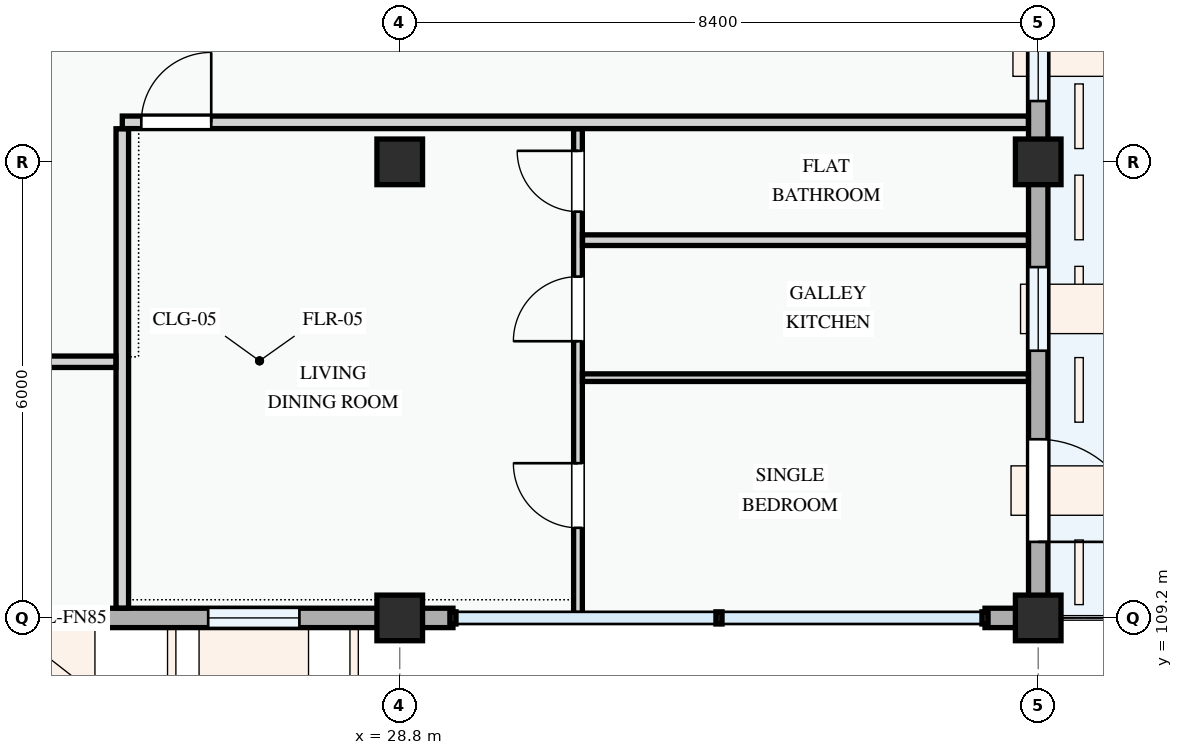
"""IFC4 building model, lengths in metres.
Left out: names, types, materials, properties, quantities, classifications, styles, units other than length and angle.
Written with IfcOpenShell. Run it as: python <this file> out.ifc"""

import sys

from ifc_helpers import new_model, si_unit, direction, frame, frame_2d, origin, origin_2d, place, context, subcontext, project, spatial, rectangle, extrude, element, fill, save


model = new_model("IFC4")
c1 = context("Model", 3, precision=1e-05, world=origin(), true_north=direction((0.0, 1.0)))
c2 = subcontext(c1, "Body", "Model", "MODEL_VIEW")
j1 = project(units=[si_unit("LENGTHUNIT", "METRE"), si_unit("PLANEANGLEUNIT", "RADIAN")], contexts=[c1])
p1 = place(None, origin())
s1 = spatial("IfcSite", under=j1, at=p1, CompositionType="ELEMENT")
p2 = place(p1, origin())
s2 = spatial("IfcBuilding", under=s1, at=p2, CompositionType="ELEMENT")
p3 = place(p2, frame((0.0, 0.0, 37.8)))
s3 = spatial("IfcBuildingStorey", under=s2, at=p3, CompositionType="ELEMENT", Elevation=37.8)
for number, where, z_axis, x_axis in (
    (1, (28.8, 109.2, 0.0), (0.0, 0.0, 1.0), (1.0, 0.0, 0.0)),
    (2, (28.8, 115.2, 0.0), (0.0, 0.0, 1.0), (1.0, 0.0, 0.0)),
    (3, (37.2, 109.2, 0.0), (0.0, 0.0, 1.0), (1.0, 0.0, 0.0)),
    (4, (37.2, 115.2, 0.0), (0.0, 0.0, 1.0), (1.0, 0.0, 0.0)),
):
    element("IfcColumn", number, at=place(p3, frame(where, z_axis=z_axis, x_axis=x_axis)), inside=s3, PredefinedType="COLUMN", context=c2, shape_type="SweptSolid", body=[
        extrude(rectangle(XDim=0.6, YDim=0.6, at=origin_2d()), origin(), (0.0, 0.0, 1.0), 3.3),
    ])
p4 = place(p3, frame((22.8, 109.2, 0.0), z_axis=(0.0, 0.0, 1.0), x_axis=(1.0, 0.0, 0.0)))
e5 = element("IfcWall", 5, at=p4, inside=s3, PredefinedType="STANDARD", context=c2, shape_type="SweptSolid", body=[
    extrude(rectangle(XDim=6.0, YDim=0.255, at=frame_2d((3.0, 0.0))), origin(), (0.0, 0.0, 1.0), 2.525),
])
p5 = place(p4, frame((0.67, 0.0, 0.78)))
e6 = element("IfcOpeningElement", 6, at=p5, cuts=e5, PredefinedType="OPENING", context=c2, shape_type="SweptSolid", body=[
    extrude(rectangle(XDim=1.2, YDim=1.35, at=frame_2d((0.6, 0.675))), frame((0.0, 0.137, 0.0), z_axis=(0.0, -1.0, 0.0), x_axis=(1.0, 0.0, 0.0)), (0.0, 0.0, 1.0), 0.275),
])
p6 = place(p4, frame((3.48, 0.0, 0.78)))
e7 = element("IfcOpeningElement", 7, at=p6, cuts=e5, PredefinedType="OPENING", context=c2, shape_type="SweptSolid", body=[
    extrude(rectangle(XDim=1.2, YDim=1.5, at=frame_2d((0.6, 0.75))), frame((0.0, 0.137, 0.0), z_axis=(0.0, -1.0, 0.0), x_axis=(1.0, 0.0, 0.0)), (0.0, 0.0, 1.0), 0.275),
])
p7 = place(p3, frame((28.8, 109.2, 0.0), z_axis=(0.0, 0.0, 1.0), x_axis=(1.0, 0.0, 0.0)))
e8 = element("IfcWall", 8, at=p7, inside=s3, PredefinedType="STANDARD", context=c2, shape_type="SweptSolid", body=[
    extrude(rectangle(XDim=0.7, YDim=0.255, at=frame_2d((0.35, 0.0))), origin(), (0.0, 0.0, 1.0), 2.375),
])
p8 = place(p3, frame((36.5, 109.2, 0.0), z_axis=(0.0, 0.0, 1.0), x_axis=(1.0, 0.0, 0.0)))
e9 = element("IfcWall", 9, at=p8, inside=s3, PredefinedType="STANDARD", context=c2, shape_type="SweptSolid", body=[
    extrude(rectangle(XDim=0.571, YDim=0.255, at=frame_2d((0.285, 0.0))), origin(), (0.0, 0.0, 1.0), 2.375),
])
p9 = place(p3, frame((37.2, 109.2, 0.0), z_axis=(0.0, 0.0, 1.0), x_axis=(0.0, 1.0, 0.0)))
e10 = element("IfcWall", 10, at=p9, inside=s3, PredefinedType="STANDARD", context=c2, shape_type="SweptSolid", body=[
    extrude(rectangle(XDim=6.0, YDim=0.255, at=frame_2d((3.0, 0.0))), origin(), (0.0, 0.0, 1.0), 2.575),
])
p10 = place(p9, frame((1.0, 0.0, 0.0)))
e11 = element("IfcOpeningElement", 11, at=p10, cuts=e10, PredefinedType="OPENING", context=c2, shape_type="SweptSolid", body=[
    extrude(rectangle(XDim=1.35, YDim=2.2, at=frame_2d((0.675, 1.1))), frame((0.0, 0.137, 0.0), z_axis=(0.0, -1.0, 0.0), x_axis=(1.0, 0.0, 0.0)), (0.0, 0.0, 1.0), 0.275),
])
p11 = place(p9, frame((3.515, 0.0, 0.78)))
e12 = element("IfcOpeningElement", 12, at=p11, cuts=e10, PredefinedType="OPENING", context=c2, shape_type="SweptSolid", body=[
    extrude(rectangle(XDim=1.1, YDim=1.3, at=frame_2d((0.55, 0.65))), frame((0.0, 0.137, 0.0), z_axis=(0.0, -1.0, 0.0), x_axis=(1.0, 0.0, 0.0)), (0.0, 0.0, 1.0), 0.275),
])
p12 = place(p3, frame((37.2, 115.2, 0.0), z_axis=(0.0, 0.0, 1.0), x_axis=(0.0, 1.0, 0.0)))
e13 = element("IfcWall", 13, at=p12, inside=s3, PredefinedType="STANDARD", context=c2, shape_type="SweptSolid", body=[
    extrude(rectangle(XDim=8.4, YDim=0.255, at=frame_2d((4.2, 0.0))), origin(), (0.0, 0.0, 1.0), 2.425),
])
p13 = place(p12, frame((6.27, 0.0, 0.0)))
e14 = element("IfcOpeningElement", 14, at=p13, cuts=e13, PredefinedType="OPENING", context=c2, shape_type="SweptSolid", body=[
    extrude(rectangle(XDim=1.15, YDim=2.15, at=frame_2d((0.575, 1.075))), frame((0.0, 0.137, 0.0), z_axis=(0.0, -1.0, 0.0), x_axis=(1.0, 0.0, 0.0)), (0.0, 0.0, 1.0), 0.275),
])
p14 = place(p12, frame((0.8, 0.0, 0.78)))
e15 = element("IfcOpeningElement", 15, at=p14, cuts=e13, PredefinedType="OPENING", context=c2, shape_type="SweptSolid", body=[
    extrude(rectangle(XDim=1.3, YDim=1.4, at=frame_2d((0.65, 0.7))), frame((0.0, 0.137, 0.0), z_axis=(0.0, -1.0, 0.0), x_axis=(1.0, 0.0, 0.0)), (0.0, 0.0, 1.0), 0.275),
])
p15 = place(p12, frame((4.145, 0.0, 0.78)))
e16 = element("IfcOpeningElement", 16, at=p15, cuts=e13, PredefinedType="OPENING", context=c2, shape_type="SweptSolid", body=[
    extrude(rectangle(XDim=1.0, YDim=1.25, at=frame_2d((0.5, 0.625))), frame((0.0, 0.137, 0.0), z_axis=(0.0, -1.0, 0.0), x_axis=(1.0, 0.0, 0.0)), (0.0, 0.0, 1.0), 0.275),
])
p16 = place(p3, frame((25.15, 109.33, 0.0), z_axis=(0.0, 0.0, 1.0), x_axis=(0.0, 1.0, 0.0)))
e17 = element("IfcWall", 17, at=p16, inside=s3, PredefinedType="PARTITIONING", context=c2, shape_type="SweptSolid", body=[
    extrude(rectangle(XDim=6.306, YDim=0.165, at=frame_2d((3.153, 0.0))), origin(), (0.0, 0.0, 1.0), 3.0),
])
p17 = place(p3, frame((22.66, 112.57, 0.0), z_axis=(0.0, 0.0, 1.0), x_axis=(1.0, 0.0, 0.0)))
e18 = element("IfcWall", 18, at=p17, inside=s3, PredefinedType="PARTITIONING", context=c2, shape_type="SweptSolid", body=[
    extrude(rectangle(XDim=2.406, YDim=0.15, at=frame_2d((1.203, 0.0))), origin(), (0.0, 0.0, 1.0), 3.0),
])
p18 = place(p3, frame((31.145, 109.26, 0.0), z_axis=(0.0, 0.0, 1.0), x_axis=(0.0, 1.0, 0.0)))
e19 = element("IfcWall", 19, at=p18, inside=s3, PredefinedType="PARTITIONING", context=c2, shape_type="SweptSolid", body=[
    extrude(rectangle(XDim=6.375, YDim=0.115, at=frame_2d((3.188, 0.0))), origin(), (0.0, 0.0, 1.0), 3.0),
])
p19 = place(p18, frame((1.125, 0.0, 0.0)))
e20 = element("IfcOpeningElement", 20, at=p19, cuts=e19, PredefinedType="OPENING", context=c2, shape_type="SweptSolid", body=[
    extrude(rectangle(XDim=0.85, YDim=2.1, at=frame_2d((0.425, 1.05))), frame((0.0, 0.067, 0.0), z_axis=(0.0, -1.0, 0.0), x_axis=(1.0, 0.0, 0.0)), (0.0, 0.0, 1.0), 0.135),
])
p20 = place(p18, frame((3.58, 0.0, 0.0)))
e21 = element("IfcOpeningElement", 21, at=p20, cuts=e19, PredefinedType="OPENING", context=c2, shape_type="SweptSolid", body=[
    extrude(rectangle(XDim=0.85, YDim=2.1, at=frame_2d((0.425, 1.05))), frame((0.0, 0.067, 0.0), z_axis=(0.0, -1.0, 0.0), x_axis=(1.0, 0.0, 0.0)), (0.0, 0.0, 1.0), 0.135),
])
p21 = place(p18, frame((5.285, 0.0, 0.0)))
e22 = element("IfcOpeningElement", 22, at=p21, cuts=e19, PredefinedType="OPENING", context=c2, shape_type="SweptSolid", body=[
    extrude(rectangle(XDim=0.8, YDim=2.1, at=frame_2d((0.4, 1.05))), frame((0.0, 0.067, 0.0), z_axis=(0.0, -1.0, 0.0), x_axis=(1.0, 0.0, 0.0)), (0.0, 0.0, 1.0), 0.135),
])
p22 = place(p3, frame((31.205, 112.361, 0.0), z_axis=(0.0, 0.0, 1.0), x_axis=(1.0, 0.0, 0.0)))
e23 = element("IfcWall", 23, at=p22, inside=s3, PredefinedType="PARTITIONING", context=c2, shape_type="SweptSolid", body=[
    extrude(rectangle(XDim=5.866, YDim=0.1, at=frame_2d((2.933, 0.0))), origin(), (0.0, 0.0, 1.0), 3.0),
])
p23 = place(p3, frame((31.205, 114.17, 0.0), z_axis=(0.0, 0.0, 1.0), x_axis=(1.0, 0.0, 0.0)))
e24 = element("IfcWall", 24, at=p23, inside=s3, PredefinedType="PARTITIONING", context=c2, shape_type="SweptSolid", body=[
    extrude(rectangle(XDim=5.866, YDim=0.14, at=frame_2d((2.933, 0.0))), origin(), (0.0, 0.0, 1.0), 3.0),
])
p24 = place(p3, frame((25.15, 115.72, 0.0), z_axis=(0.0, 0.0, 1.0), x_axis=(1.0, 0.0, 0.0)))
e25 = element("IfcWall", 25, at=p24, inside=s3, PredefinedType="PARTITIONING", context=c2, shape_type="SweptSolid", body=[
    extrude(rectangle(XDim=11.921, YDim=0.165, at=frame_2d((5.96, 0.0))), origin(), (0.0, 0.0, 1.0), 3.0),
])
p25 = place(p24, frame((0.25, 0.0, 0.0)))
e26 = element("IfcOpeningElement", 26, at=p25, cuts=e25, PredefinedType="OPENING", context=c2, shape_type="SweptSolid", body=[
    extrude(rectangle(XDim=0.92, YDim=2.1, at=frame_2d((0.46, 1.05))), frame((0.0, 0.093, 0.0), z_axis=(0.0, -1.0, 0.0), x_axis=(1.0, 0.0, 0.0)), (0.0, 0.0, 1.0), 0.185),
])
p26 = place(p5, origin())
e27 = element("IfcWindow", 27, at=p26, inside=s3, PartitioningType="SINGLE_PANEL", PredefinedType="WINDOW", context=c2, shape_type="SweptSolid", body=[
    extrude(rectangle(XDim=1.2, YDim=1.35, at=frame_2d((0.6, 0.675))), frame((0.0, 0.03, 0.0), z_axis=(0.0, -1.0, 0.0), x_axis=(1.0, 0.0, 0.0)), (0.0, 0.0, 1.0), 0.06),
])
fill(e6, e27)
p27 = place(p6, origin())
e28 = element("IfcWindow", 28, at=p27, inside=s3, PartitioningType="SINGLE_PANEL", PredefinedType="WINDOW", context=c2, shape_type="SweptSolid", body=[
    extrude(rectangle(XDim=1.2, YDim=1.5, at=frame_2d((0.6, 0.75))), frame((0.0, 0.03, 0.0), z_axis=(0.0, -1.0, 0.0), x_axis=(1.0, 0.0, 0.0)), (0.0, 0.0, 1.0), 0.06),
])
fill(e7, e28)
p28 = place(p10, frame((1.35, 0.0, 0.0), z_axis=(0.0, 0.0, 1.0), x_axis=(-1.0, 0.0, 0.0)))
e29 = element("IfcDoor", 29, at=p28, inside=s3, OperationType="SINGLE_SWING_RIGHT", PredefinedType="DOOR", context=c2, shape_type="SweptSolid", body=[
    extrude(rectangle(XDim=1.35, YDim=2.2, at=frame_2d((0.675, 1.1))), frame((0.0, 0.025, 0.0), z_axis=(0.0, -1.0, 0.0), x_axis=(1.0, 0.0, 0.0)), (0.0, 0.0, 1.0), 0.05),
])
fill(e11, e29)
p29 = place(p11, origin())
e30 = element("IfcWindow", 30, at=p29, inside=s3, PartitioningType="SINGLE_PANEL", PredefinedType="WINDOW", context=c2, shape_type="SweptSolid", body=[
    extrude(rectangle(XDim=1.1, YDim=1.3, at=frame_2d((0.55, 0.65))), frame((0.0, 0.03, 0.0), z_axis=(0.0, -1.0, 0.0), x_axis=(1.0, 0.0, 0.0)), (0.0, 0.0, 1.0), 0.06),
])
fill(e12, e30)
p30 = place(p14, origin())
e31 = element("IfcWindow", 31, at=p30, inside=s3, PartitioningType="SINGLE_PANEL", PredefinedType="WINDOW", context=c2, shape_type="SweptSolid", body=[
    extrude(rectangle(XDim=1.3, YDim=1.4, at=frame_2d((0.65, 0.7))), frame((0.0, 0.03, 0.0), z_axis=(0.0, -1.0, 0.0), x_axis=(1.0, 0.0, 0.0)), (0.0, 0.0, 1.0), 0.06),
])
fill(e15, e31)
p31 = place(p19, origin())
e32 = element("IfcDoor", 32, at=p31, inside=s3, OperationType="SINGLE_SWING_RIGHT", PredefinedType="DOOR", context=c2, shape_type="SweptSolid", body=[
    extrude(rectangle(XDim=0.85, YDim=2.1, at=frame_2d((0.425, 1.05))), frame((0.0, 0.025, 0.0), z_axis=(0.0, -1.0, 0.0), x_axis=(1.0, 0.0, 0.0)), (0.0, 0.0, 1.0), 0.05),
])
fill(e20, e32)
p32 = place(p20, origin())
e33 = element("IfcDoor", 33, at=p32, inside=s3, OperationType="SINGLE_SWING_LEFT", PredefinedType="DOOR", context=c2, shape_type="SweptSolid", body=[
    extrude(rectangle(XDim=0.85, YDim=2.1, at=frame_2d((0.425, 1.05))), frame((0.0, 0.025, 0.0), z_axis=(0.0, -1.0, 0.0), x_axis=(1.0, 0.0, 0.0)), (0.0, 0.0, 1.0), 0.05),
])
fill(e21, e33)
p33 = place(p21, origin())
e34 = element("IfcDoor", 34, at=p33, inside=s3, OperationType="SINGLE_SWING_RIGHT", PredefinedType="DOOR", context=c2, shape_type="SweptSolid", body=[
    extrude(rectangle(XDim=0.8, YDim=2.1, at=frame_2d((0.4, 1.05))), frame((0.0, 0.025, 0.0), z_axis=(0.0, -1.0, 0.0), x_axis=(1.0, 0.0, 0.0)), (0.0, 0.0, 1.0), 0.05),
])
fill(e22, e34)
p34 = place(p25, origin())
e35 = element("IfcDoor", 35, at=p34, inside=s3, OperationType="SINGLE_SWING_RIGHT", PredefinedType="DOOR", context=c2, shape_type="SweptSolid", body=[
    extrude(rectangle(XDim=0.92, YDim=2.1, at=frame_2d((0.46, 1.05))), frame((0.0, 0.025, 0.0), z_axis=(0.0, -1.0, 0.0), x_axis=(1.0, 0.0, 0.0)), (0.0, 0.0, 1.0), 0.05),
])
fill(e26, e35)
save(model, sys.argv[1])
